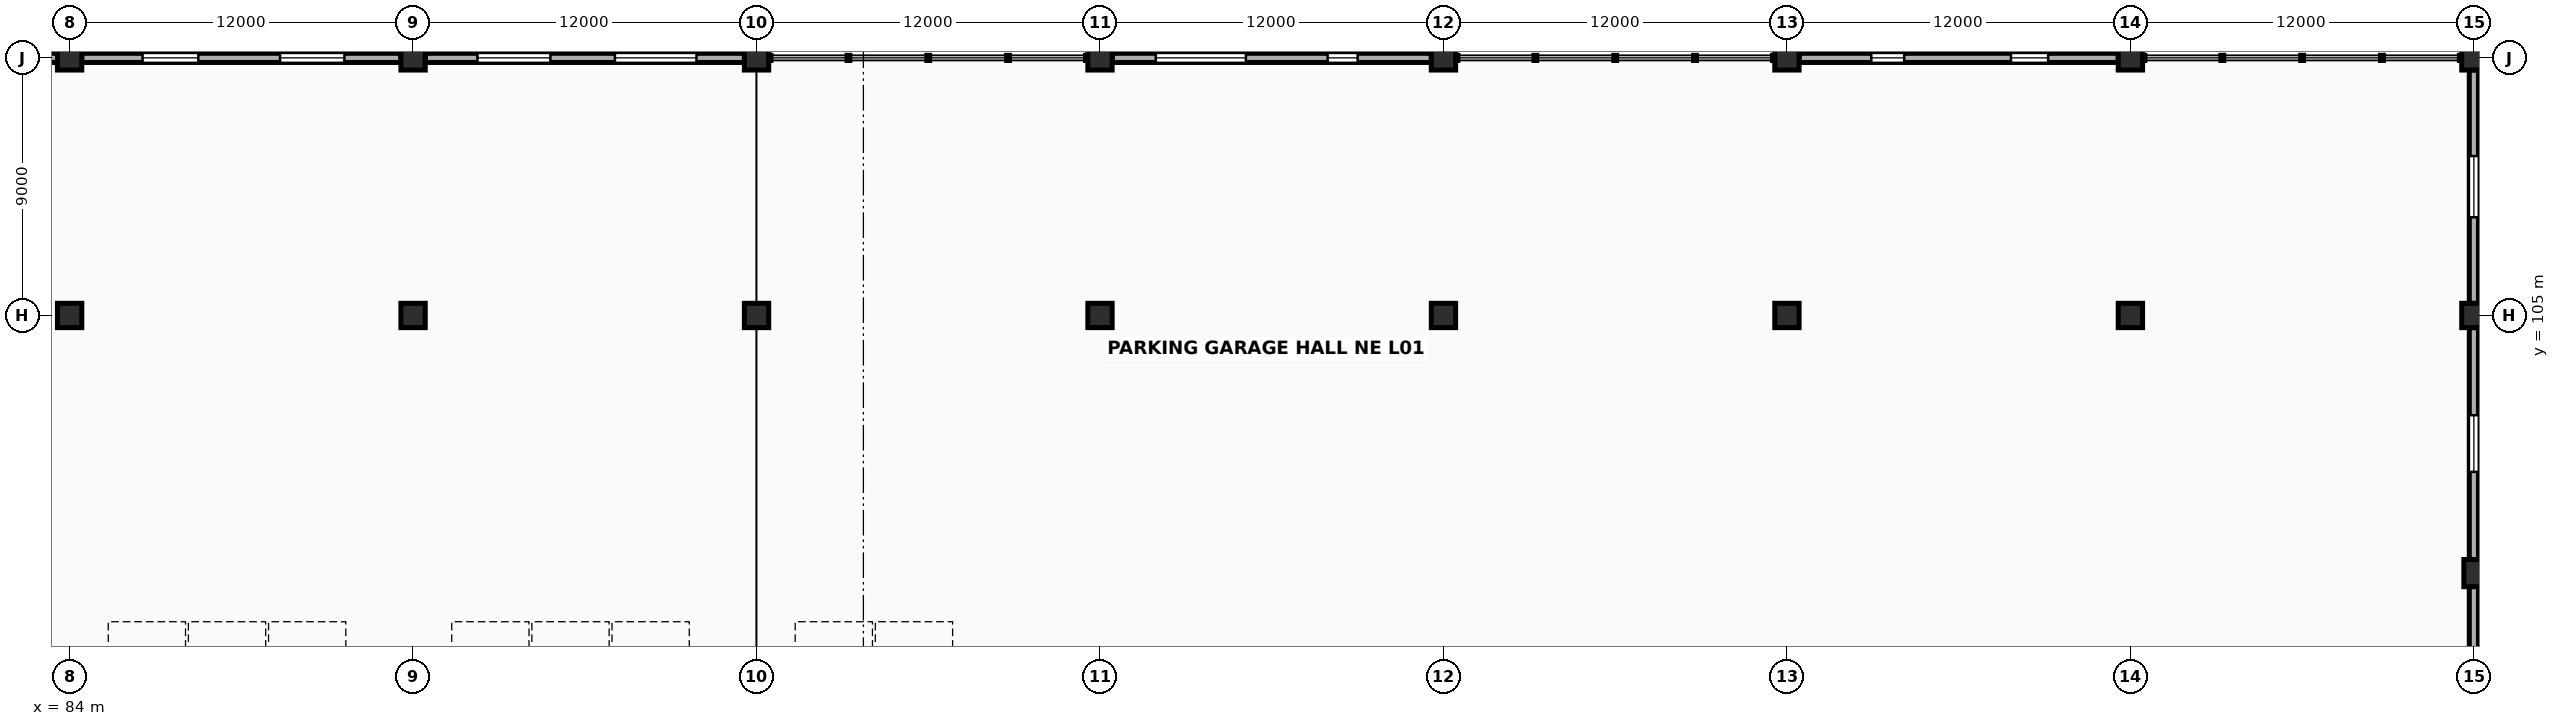
"""IFC4 building model, lengths in metres.
Left out: names, types, materials, properties, quantities, classifications, styles, units other than length and angle.
Written with IfcOpenShell. Run it as: python <this file> out.ifc"""

import sys

from ifc_helpers import new_model, si_unit, direction, frame, frame_2d, origin, origin_2d, place, context, subcontext, project, spatial, rectangle, extrude, element, fill, save


model = new_model("IFC4")
c1 = context("Model", 3, precision=1e-05, world=origin(), true_north=direction((0.0, 1.0)))
c2 = subcontext(c1, "Body", "Model", "MODEL_VIEW")
j1 = project(units=[si_unit("LENGTHUNIT", "METRE"), si_unit("PLANEANGLEUNIT", "RADIAN")], contexts=[c1])
p1 = place(None, origin())
s1 = spatial("IfcSite", under=j1, at=p1, CompositionType="ELEMENT")
p2 = place(p1, origin())
s2 = spatial("IfcBuilding", under=s1, at=p2, CompositionType="ELEMENT")
p3 = place(p2, frame((0.0, 0.0, 5.4)))
s3 = spatial("IfcBuildingStorey", under=s2, at=p3, CompositionType="ELEMENT", Elevation=5.4)
for number, where, z_axis, x_axis in (
    (1, (84.0, 105.0, 0.0), (0.0, 0.0, 1.0), (1.0, 0.0, 0.0)),
    (2, (84.0, 114.0, 0.0), (0.0, 0.0, 1.0), (1.0, 0.0, 0.0)),
    (3, (96.0, 105.0, 0.0), (0.0, 0.0, 1.0), (1.0, 0.0, 0.0)),
    (4, (96.0, 114.0, 0.0), (0.0, 0.0, 1.0), (1.0, 0.0, 0.0)),
    (5, (108.0, 105.0, 0.0), (0.0, 0.0, 1.0), (1.0, 0.0, 0.0)),
    (6, (108.0, 114.0, 0.0), (0.0, 0.0, 1.0), (1.0, 0.0, 0.0)),
    (7, (120.0, 105.0, 0.0), (0.0, 0.0, 1.0), (1.0, 0.0, 0.0)),
    (8, (120.0, 114.0, 0.0), (0.0, 0.0, 1.0), (1.0, 0.0, 0.0)),
    (9, (132.0, 105.0, 0.0), (0.0, 0.0, 1.0), (1.0, 0.0, 0.0)),
    (10, (132.0, 114.0, 0.0), (0.0, 0.0, 1.0), (1.0, 0.0, 0.0)),
    (11, (144.0, 105.0, 0.0), (0.0, 0.0, 1.0), (1.0, 0.0, 0.0)),
    (12, (144.0, 114.0, 0.0), (0.0, 0.0, 1.0), (1.0, 0.0, 0.0)),
    (13, (156.0, 105.0, 0.0), (0.0, 0.0, 1.0), (1.0, 0.0, 0.0)),
    (14, (156.0, 114.0, 0.0), (0.0, 0.0, 1.0), (1.0, 0.0, 0.0)),
    (15, (168.0, 105.0, 0.0), (0.0, 0.0, 1.0), (1.0, 0.0, 0.0)),
    (16, (168.0, 114.0, 0.0), (0.0, 0.0, 1.0), (1.0, 0.0, 0.0)),
):
    element("IfcColumn", number, at=place(p3, frame(where, z_axis=z_axis, x_axis=x_axis)), inside=s3, PredefinedType="COLUMN", context=c2, shape_type="SweptSolid", body=[
        extrude(rectangle(XDim=0.85, YDim=0.85, at=origin_2d()), origin(), (0.0, 0.0, 1.0), 4.2),
    ])
p4 = place(p3, frame((168.0, 96.0, 0.0), z_axis=(0.0, 0.0, 1.0), x_axis=(1.0, 0.0, 0.0)))
e17 = element("IfcColumn", 17, at=p4, inside=s3, PredefinedType="PILASTER", context=c2, shape_type="SweptSolid", body=[
    extrude(rectangle(XDim=0.7, YDim=0.95, at=origin_2d()), origin(), (0.0, 0.0, 1.0), 4.2),
])
p5 = place(p3, frame((72.423, 114.0, 0.0), z_axis=(0.0, 0.0, 1.0), x_axis=(1.0, 0.0, 0.0)))
e18 = element("IfcWall", 18, at=p5, inside=s3, PredefinedType="SOLIDWALL", context=c2, shape_type="SweptSolid", body=[
    extrude(rectangle(XDim=11.154, YDim=0.32, at=frame_2d((5.577, 0.0))), origin(), (0.0, 0.0, 1.0), 2.69),
])
p6 = place(p5, frame((1.97, 0.0, 0.55)))
e19 = element("IfcOpeningElement", 19, at=p6, cuts=e18, PredefinedType="OPENING", context=c2, shape_type="SweptSolid", body=[
    extrude(rectangle(XDim=2.26, YDim=1.9, at=frame_2d((1.13, 0.95))), frame((0.0, 0.175, 0.0), z_axis=(0.0, -1.0, 0.0), x_axis=(1.0, 0.0, 0.0)), (0.0, 0.0, 1.0), 0.35),
])
p7 = place(p5, frame((6.804, 0.0, 0.55)))
e20 = element("IfcOpeningElement", 20, at=p7, cuts=e18, PredefinedType="OPENING", context=c2, shape_type="SweptSolid", body=[
    extrude(rectangle(XDim=2.5, YDim=1.9, at=frame_2d((1.25, 0.95))), frame((0.0, 0.175, 0.0), z_axis=(0.0, -1.0, 0.0), x_axis=(1.0, 0.0, 0.0)), (0.0, 0.0, 1.0), 0.35),
])
p8 = place(p3, frame((84.423, 114.0, 0.0), z_axis=(0.0, 0.0, 1.0), x_axis=(1.0, 0.0, 0.0)))
e21 = element("IfcWall", 21, at=p8, inside=s3, PredefinedType="SOLIDWALL", context=c2, shape_type="SweptSolid", body=[
    extrude(rectangle(XDim=11.154, YDim=0.32, at=frame_2d((5.577, 0.0))), origin(), (0.0, 0.0, 1.0), 2.69),
])
p9 = place(p8, frame((2.125, 0.0, 1.35)))
e22 = element("IfcOpeningElement", 22, at=p9, cuts=e21, PredefinedType="OPENING", context=c2, shape_type="SweptSolid", body=[
    extrude(rectangle(XDim=1.95, YDim=0.88, at=frame_2d((0.975, 0.44))), frame((0.0, 0.175, 0.0), z_axis=(0.0, -1.0, 0.0), x_axis=(1.0, 0.0, 0.0)), (0.0, 0.0, 1.0), 0.35),
])
p10 = place(p8, frame((6.929, 0.0, 1.35)))
e23 = element("IfcOpeningElement", 23, at=p10, cuts=e21, PredefinedType="OPENING", context=c2, shape_type="SweptSolid", body=[
    extrude(rectangle(XDim=2.25, YDim=0.88, at=frame_2d((1.125, 0.44))), frame((0.0, 0.175, 0.0), z_axis=(0.0, -1.0, 0.0), x_axis=(1.0, 0.0, 0.0)), (0.0, 0.0, 1.0), 0.35),
])
p11 = place(p3, frame((96.423, 114.0, 0.0), z_axis=(0.0, 0.0, 1.0), x_axis=(1.0, 0.0, 0.0)))
e24 = element("IfcWall", 24, at=p11, inside=s3, PredefinedType="SOLIDWALL", context=c2, shape_type="SweptSolid", body=[
    extrude(rectangle(XDim=11.154, YDim=0.32, at=frame_2d((5.577, 0.0))), origin(), (0.0, 0.0, 1.0), 2.69),
])
p12 = place(p11, frame((1.825, 0.0, 1.35)))
e25 = element("IfcOpeningElement", 25, at=p12, cuts=e24, PredefinedType="OPENING", context=c2, shape_type="SweptSolid", body=[
    extrude(rectangle(XDim=2.55, YDim=0.88, at=frame_2d((1.275, 0.44))), frame((0.0, 0.175, 0.0), z_axis=(0.0, -1.0, 0.0), x_axis=(1.0, 0.0, 0.0)), (0.0, 0.0, 1.0), 0.35),
])
p13 = place(p11, frame((6.629, 0.0, 1.35)))
e26 = element("IfcOpeningElement", 26, at=p13, cuts=e24, PredefinedType="OPENING", context=c2, shape_type="SweptSolid", body=[
    extrude(rectangle(XDim=2.85, YDim=0.88, at=frame_2d((1.425, 0.44))), frame((0.0, 0.175, 0.0), z_axis=(0.0, -1.0, 0.0), x_axis=(1.0, 0.0, 0.0)), (0.0, 0.0, 1.0), 0.35),
])
p14 = place(p3, frame((120.423, 114.0, 0.0), z_axis=(0.0, 0.0, 1.0), x_axis=(1.0, 0.0, 0.0)))
e27 = element("IfcWall", 27, at=p14, inside=s3, PredefinedType="SOLIDWALL", context=c2, shape_type="SweptSolid", body=[
    extrude(rectangle(XDim=11.154, YDim=0.32, at=frame_2d((5.577, 0.0))), origin(), (0.0, 0.0, 1.0), 2.69),
])
p15 = place(p14, frame((1.525, 0.0, 1.35)))
e28 = element("IfcOpeningElement", 28, at=p15, cuts=e27, PredefinedType="OPENING", context=c2, shape_type="SweptSolid", body=[
    extrude(rectangle(XDim=3.15, YDim=0.88, at=frame_2d((1.575, 0.44))), frame((0.0, 0.175, 0.0), z_axis=(0.0, -1.0, 0.0), x_axis=(1.0, 0.0, 0.0)), (0.0, 0.0, 1.0), 0.35),
])
p16 = place(p14, frame((7.529, 0.0, 0.55)))
e29 = element("IfcOpeningElement", 29, at=p16, cuts=e27, PredefinedType="OPENING", context=c2, shape_type="SweptSolid", body=[
    extrude(rectangle(XDim=1.05, YDim=1.25, at=frame_2d((0.525, 0.625))), frame((0.0, 0.175, 0.0), z_axis=(0.0, -1.0, 0.0), x_axis=(1.0, 0.0, 0.0)), (0.0, 0.0, 1.0), 0.35),
])
p17 = place(p3, frame((144.423, 114.0, 0.0), z_axis=(0.0, 0.0, 1.0), x_axis=(1.0, 0.0, 0.0)))
e30 = element("IfcWall", 30, at=p17, inside=s3, PredefinedType="SOLIDWALL", context=c2, shape_type="SweptSolid", body=[
    extrude(rectangle(XDim=11.154, YDim=0.32, at=frame_2d((5.577, 0.0))), origin(), (0.0, 0.0, 1.0), 2.69),
])
p18 = place(p17, frame((2.525, 0.0, 0.55)))
e31 = element("IfcOpeningElement", 31, at=p18, cuts=e30, PredefinedType="OPENING", context=c2, shape_type="SweptSolid", body=[
    extrude(rectangle(XDim=1.15, YDim=1.25, at=frame_2d((0.575, 0.625))), frame((0.0, 0.175, 0.0), z_axis=(0.0, -1.0, 0.0), x_axis=(1.0, 0.0, 0.0)), (0.0, 0.0, 1.0), 0.35),
])
p19 = place(p17, frame((7.404, 0.0, 0.55)))
e32 = element("IfcOpeningElement", 32, at=p19, cuts=e30, PredefinedType="OPENING", context=c2, shape_type="SweptSolid", body=[
    extrude(rectangle(XDim=1.3, YDim=1.25, at=frame_2d((0.65, 0.625))), frame((0.0, 0.175, 0.0), z_axis=(0.0, -1.0, 0.0), x_axis=(1.0, 0.0, 0.0)), (0.0, 0.0, 1.0), 0.35),
])
p20 = place(p3, frame((168.0, 87.423, 0.0), z_axis=(0.0, 0.0, 1.0), x_axis=(0.0, 1.0, 0.0)))
e33 = element("IfcWall", 33, at=p20, inside=s3, PredefinedType="SOLIDWALL", context=c2, shape_type="SweptSolid", body=[
    extrude(rectangle(XDim=8.104, YDim=0.32, at=frame_2d((4.052, 0.0))), origin(), (0.0, 0.0, 1.0), 2.69),
])
p21 = place(p20, frame((3.142, 0.0, 0.55)))
e34 = element("IfcOpeningElement", 34, at=p21, cuts=e33, PredefinedType="OPENING", context=c2, shape_type="SweptSolid", body=[
    extrude(rectangle(XDim=1.82, YDim=1.58, at=frame_2d((0.91, 0.79))), frame((0.0, 0.175, 0.0), z_axis=(0.0, -1.0, 0.0), x_axis=(1.0, 0.0, 0.0)), (0.0, 0.0, 1.0), 0.35),
])
p22 = place(p3, frame((168.0, 96.473, 0.0), z_axis=(0.0, 0.0, 1.0), x_axis=(0.0, 1.0, 0.0)))
e35 = element("IfcWall", 35, at=p22, inside=s3, PredefinedType="SOLIDWALL", context=c2, shape_type="SweptSolid", body=[
    extrude(rectangle(XDim=8.104, YDim=0.32, at=frame_2d((4.052, 0.0))), origin(), (0.0, 0.0, 1.0), 2.69),
])
p23 = place(p22, frame((3.062, 0.0, 0.55)))
e36 = element("IfcOpeningElement", 36, at=p23, cuts=e35, PredefinedType="OPENING", context=c2, shape_type="SweptSolid", body=[
    extrude(rectangle(XDim=1.98, YDim=1.58, at=frame_2d((0.99, 0.79))), frame((0.0, 0.175, 0.0), z_axis=(0.0, -1.0, 0.0), x_axis=(1.0, 0.0, 0.0)), (0.0, 0.0, 1.0), 0.35),
])
p24 = place(p3, frame((168.0, 105.423, 0.0), z_axis=(0.0, 0.0, 1.0), x_axis=(0.0, 1.0, 0.0)))
e37 = element("IfcWall", 37, at=p24, inside=s3, PredefinedType="SOLIDWALL", context=c2, shape_type="SweptSolid", body=[
    extrude(rectangle(XDim=8.154, YDim=0.32, at=frame_2d((4.077, 0.0))), origin(), (0.0, 0.0, 1.0), 2.69),
])
p25 = place(p24, frame((3.007, 0.0, 0.55)))
e38 = element("IfcOpeningElement", 38, at=p25, cuts=e37, PredefinedType="OPENING", context=c2, shape_type="SweptSolid", body=[
    extrude(rectangle(XDim=2.14, YDim=1.58, at=frame_2d((1.07, 0.79))), frame((0.0, 0.175, 0.0), z_axis=(0.0, -1.0, 0.0), x_axis=(1.0, 0.0, 0.0)), (0.0, 0.0, 1.0), 0.35),
])
p26 = place(p9, origin())
e39 = element("IfcWindow", 39, at=p26, inside=s3, PartitioningType="DOUBLE_PANEL_VERTICAL", PredefinedType="USERDEFINED", context=c2, shape_type="SweptSolid", body=[
    extrude(rectangle(XDim=1.95, YDim=0.88, at=frame_2d((0.975, 0.44))), frame((0.0, 0.03, 0.0), z_axis=(0.0, -1.0, 0.0), x_axis=(1.0, 0.0, 0.0)), (0.0, 0.0, 1.0), 0.06),
])
fill(e22, e39)
p27 = place(p10, origin())
e40 = element("IfcWindow", 40, at=p27, inside=s3, PartitioningType="DOUBLE_PANEL_VERTICAL", PredefinedType="USERDEFINED", context=c2, shape_type="SweptSolid", body=[
    extrude(rectangle(XDim=2.25, YDim=0.88, at=frame_2d((1.125, 0.44))), frame((0.0, 0.03, 0.0), z_axis=(0.0, -1.0, 0.0), x_axis=(1.0, 0.0, 0.0)), (0.0, 0.0, 1.0), 0.06),
])
fill(e23, e40)
p28 = place(p12, origin())
e41 = element("IfcWindow", 41, at=p28, inside=s3, PartitioningType="DOUBLE_PANEL_VERTICAL", PredefinedType="USERDEFINED", context=c2, shape_type="SweptSolid", body=[
    extrude(rectangle(XDim=2.55, YDim=0.88, at=frame_2d((1.275, 0.44))), frame((0.0, 0.03, 0.0), z_axis=(0.0, -1.0, 0.0), x_axis=(1.0, 0.0, 0.0)), (0.0, 0.0, 1.0), 0.06),
])
fill(e25, e41)
p29 = place(p13, origin())
e42 = element("IfcWindow", 42, at=p29, inside=s3, PartitioningType="DOUBLE_PANEL_VERTICAL", PredefinedType="USERDEFINED", context=c2, shape_type="SweptSolid", body=[
    extrude(rectangle(XDim=2.85, YDim=0.88, at=frame_2d((1.425, 0.44))), frame((0.0, 0.03, 0.0), z_axis=(0.0, -1.0, 0.0), x_axis=(1.0, 0.0, 0.0)), (0.0, 0.0, 1.0), 0.06),
])
fill(e26, e42)
p30 = place(p15, origin())
e43 = element("IfcWindow", 43, at=p30, inside=s3, PartitioningType="DOUBLE_PANEL_VERTICAL", PredefinedType="USERDEFINED", context=c2, shape_type="SweptSolid", body=[
    extrude(rectangle(XDim=3.15, YDim=0.88, at=frame_2d((1.575, 0.44))), frame((0.0, 0.03, 0.0), z_axis=(0.0, -1.0, 0.0), x_axis=(1.0, 0.0, 0.0)), (0.0, 0.0, 1.0), 0.06),
])
fill(e28, e43)
p31 = place(p16, origin())
e44 = element("IfcWindow", 44, at=p31, inside=s3, PartitioningType="SINGLE_PANEL", PredefinedType="WINDOW", context=c2, shape_type="SweptSolid", body=[
    extrude(rectangle(XDim=1.05, YDim=1.25, at=frame_2d((0.525, 0.625))), frame((0.0, 0.03, 0.0), z_axis=(0.0, -1.0, 0.0), x_axis=(1.0, 0.0, 0.0)), (0.0, 0.0, 1.0), 0.06),
])
fill(e29, e44)
p32 = place(p18, origin())
e45 = element("IfcWindow", 45, at=p32, inside=s3, PartitioningType="SINGLE_PANEL", PredefinedType="WINDOW", context=c2, shape_type="SweptSolid", body=[
    extrude(rectangle(XDim=1.15, YDim=1.25, at=frame_2d((0.575, 0.625))), frame((0.0, 0.03, 0.0), z_axis=(0.0, -1.0, 0.0), x_axis=(1.0, 0.0, 0.0)), (0.0, 0.0, 1.0), 0.06),
])
fill(e31, e45)
p33 = place(p19, origin())
e46 = element("IfcWindow", 46, at=p33, inside=s3, PartitioningType="SINGLE_PANEL", PredefinedType="WINDOW", context=c2, shape_type="SweptSolid", body=[
    extrude(rectangle(XDim=1.3, YDim=1.25, at=frame_2d((0.65, 0.625))), frame((0.0, 0.03, 0.0), z_axis=(0.0, -1.0, 0.0), x_axis=(1.0, 0.0, 0.0)), (0.0, 0.0, 1.0), 0.06),
])
fill(e32, e46)
p34 = place(p23, origin())
e47 = element("IfcWindow", 47, at=p34, inside=s3, PartitioningType="DOUBLE_PANEL_VERTICAL", PredefinedType="WINDOW", context=c2, shape_type="SweptSolid", body=[
    extrude(rectangle(XDim=1.98, YDim=1.58, at=frame_2d((0.99, 0.79))), frame((0.0, 0.03, 0.0), z_axis=(0.0, -1.0, 0.0), x_axis=(1.0, 0.0, 0.0)), (0.0, 0.0, 1.0), 0.06),
])
fill(e36, e47)
p35 = place(p25, origin())
e48 = element("IfcWindow", 48, at=p35, inside=s3, PartitioningType="DOUBLE_PANEL_VERTICAL", PredefinedType="WINDOW", context=c2, shape_type="SweptSolid", body=[
    extrude(rectangle(XDim=2.14, YDim=1.58, at=frame_2d((1.07, 0.79))), frame((0.0, 0.03, 0.0), z_axis=(0.0, -1.0, 0.0), x_axis=(1.0, 0.0, 0.0)), (0.0, 0.0, 1.0), 0.06),
])
fill(e38, e48)
save(model, sys.argv[1])
